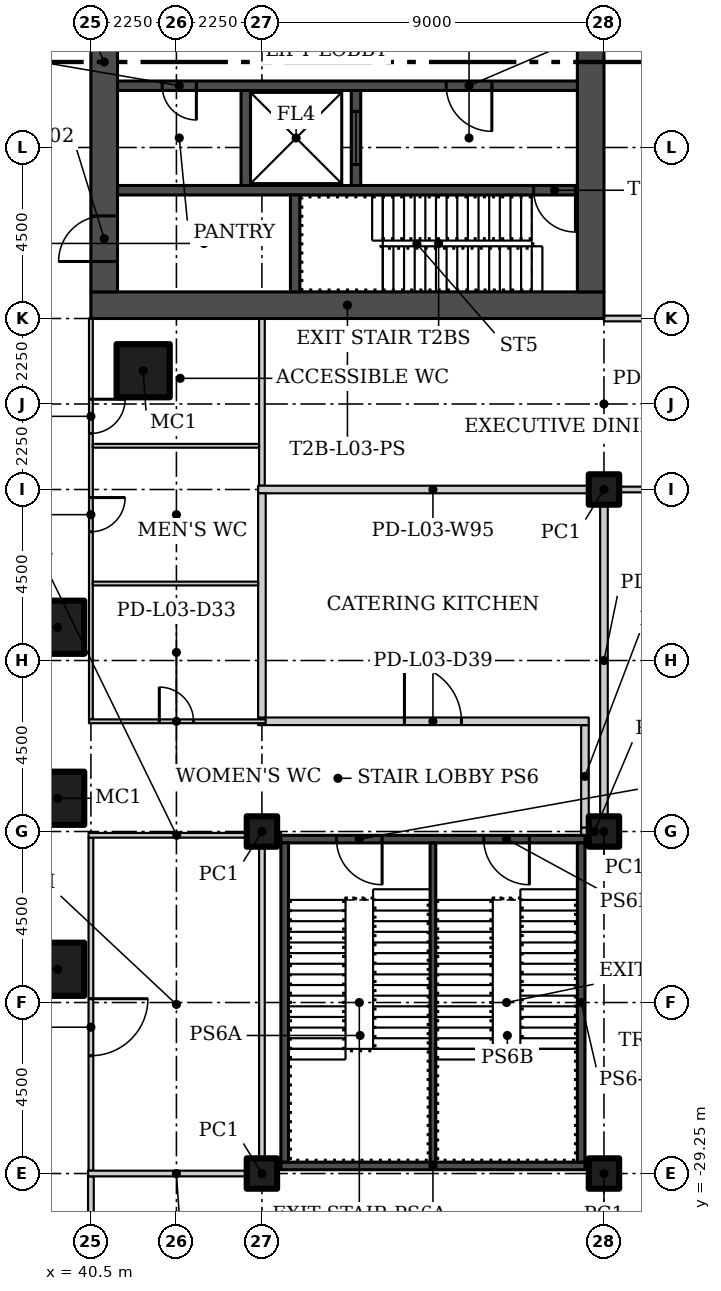
"""IFC4 building model, lengths in metres.
Left out: names, types, materials, properties, quantities, classifications, styles, units other than length and angle.
Written with IfcOpenShell. Run it as: python <this file> out.ifc"""

import sys

from ifc_helpers import new_model, si_unit, direction, frame, frame_2d, origin, origin_2d, place, context, subcontext, project, spatial, rectangle, hollow_rectangle, extrude, element, fill, save


model = new_model("IFC4")
c1 = context("Model", 3, precision=1e-05, world=origin(), true_north=direction((0.0, 1.0)))
c2 = subcontext(c1, "Body", "Model", "MODEL_VIEW")
j1 = project(units=[si_unit("LENGTHUNIT", "METRE"), si_unit("PLANEANGLEUNIT", "RADIAN")], contexts=[c1])
p1 = place(None, origin())
s1 = spatial("IfcSite", under=j1, at=p1, CompositionType="ELEMENT")
p2 = place(p1, origin())
s2 = spatial("IfcBuilding", under=s1, at=p2, CompositionType="ELEMENT")
p3 = place(p2, frame((0.0, 0.0, 18.5)))
s3 = spatial("IfcBuildingStorey", under=s2, at=p3, CompositionType="ELEMENT", Elevation=18.5)
for number, where in (
    (1, (41.875, -8.125, 0.0)),
    (2, (39.625, -14.875, 0.0)),
    (3, (39.625, -19.375, 0.0)),
    (4, (39.625, -23.875, 0.0)),
):
    element("IfcColumn", number, at=place(p3, frame(where)), inside=s3, PredefinedType="COLUMN", context=c2, shape_type="SweptSolid", body=[
        extrude(hollow_rectangle(XDim=1.4, YDim=1.4, WallThickness=0.06, at=origin_2d()), origin(), (0.0, 0.0, 1.0), 4.6),
    ])
for number, where in (
    (5, (45.0, -29.25, 0.0)),
    (6, (45.0, -20.25, 0.0)),
    (7, (54.0, -29.25, 0.0)),
    (8, (54.0, -20.25, 0.0)),
    (9, (54.0, -11.25, 0.0)),
):
    element("IfcColumn", number, at=place(p3, frame(where)), inside=s3, PredefinedType="COLUMN", context=c2, shape_type="SweptSolid", body=[
        extrude(hollow_rectangle(XDim=0.8, YDim=0.8, WallThickness=0.03, at=origin_2d()), origin(), (0.0, 0.0, 1.0), 4.6),
    ])
p4 = place(p3, frame((40.5, -29.325, 0.0), z_axis=(0.0, 0.0, 1.0), x_axis=(0.0, -1.0, 0.0)))
e10 = element("IfcWall", 10, at=p4, inside=s3, PredefinedType="PARTITIONING", context=c2, shape_type="SweptSolid", body=[
    extrude(rectangle(XDim=4.33, YDim=0.15, at=frame_2d((2.165, 0.0))), origin(), (0.0, 0.0, 1.0), 4.6),
])
p5 = place(p4, frame((1.425, 0.0, 0.0)))
e11 = element("IfcOpeningElement", 11, at=p5, cuts=e10, PredefinedType="OPENING", context=c2, shape_type="SweptSolid", body=[
    extrude(rectangle(XDim=1.5, YDim=2.1, at=frame_2d((0.75, 1.05))), frame((0.0, 0.085, 0.0), z_axis=(0.0, -1.0, 0.0), x_axis=(1.0, 0.0, 0.0)), (0.0, 0.0, 1.0), 0.17),
])
p6 = place(p3, frame((40.5, -6.75, 0.0), z_axis=(0.0, 0.0, 1.0), x_axis=(0.0, -1.0, 0.0)))
e12 = element("IfcWall", 12, at=p6, inside=s3, PredefinedType="PARTITIONING", context=c2, shape_type="SweptSolid", body=[
    extrude(rectangle(XDim=10.55, YDim=0.1, at=frame_2d((5.275, 0.0))), origin(), (0.0, 0.0, 1.0), 4.6),
])
p7 = place(p6, frame((2.125, 0.0, 0.0)))
e13 = element("IfcOpeningElement", 13, at=p7, cuts=e12, PredefinedType="OPENING", context=c2, shape_type="SweptSolid", body=[
    extrude(rectangle(XDim=0.9, YDim=2.1, at=frame_2d((0.45, 1.05))), frame((0.0, 0.06, 0.0), z_axis=(0.0, -1.0, 0.0), x_axis=(1.0, 0.0, 0.0)), (0.0, 0.0, 1.0), 0.12),
])
p8 = place(p6, frame((4.712, 0.0, 0.0)))
e14 = element("IfcOpeningElement", 14, at=p8, cuts=e12, PredefinedType="OPENING", context=c2, shape_type="SweptSolid", body=[
    extrude(rectangle(XDim=0.9, YDim=2.1, at=frame_2d((0.45, 1.05))), frame((0.0, 0.06, 0.0), z_axis=(0.0, -1.0, 0.0), x_axis=(1.0, 0.0, 0.0)), (0.0, 0.0, 1.0), 0.12),
])
p9 = place(p3, frame((40.5, -20.412, 0.0), z_axis=(0.0, 0.0, 1.0), x_axis=(0.0, -1.0, 0.0)))
e15 = element("IfcWall", 15, at=p9, inside=s3, PredefinedType="PARTITIONING", context=c2, shape_type="SweptSolid", body=[
    extrude(rectangle(XDim=8.763, YDim=0.125, at=frame_2d((4.381, 0.0))), origin(), (0.0, 0.0, 1.0), 4.6),
])
p10 = place(p9, frame((4.238, 0.0, 0.0)))
e16 = element("IfcOpeningElement", 16, at=p10, cuts=e15, PredefinedType="OPENING", context=c2, shape_type="SweptSolid", body=[
    extrude(rectangle(XDim=1.5, YDim=2.1, at=frame_2d((0.75, 1.05))), frame((0.0, 0.073, 0.0), z_axis=(0.0, -1.0, 0.0), x_axis=(1.0, 0.0, 0.0)), (0.0, 0.0, 1.0), 0.145),
])
p11 = place(p3, frame((45.075, -29.25, 0.0), z_axis=(0.0, 0.0, 1.0), x_axis=(-1.0, 0.0, 0.0)))
e17 = element("IfcWall", 17, at=p11, inside=s3, PredefinedType="PARTITIONING", context=c2, shape_type="SweptSolid", body=[
    extrude(rectangle(XDim=4.65, YDim=0.15, at=frame_2d((2.325, 0.0))), origin(), (0.0, 0.0, 1.0), 4.6),
])
p12 = place(p3, frame((54.0, -6.75, 0.0)))
e18 = element("IfcWall", 18, at=p12, inside=s3, PredefinedType="PARTITIONING", context=c2, shape_type="SweptSolid", body=[
    extrude(rectangle(XDim=8.905, YDim=0.15, at=frame_2d((4.453, 0.0))), origin(), (0.0, 0.0, 1.0), 4.6),
])
p13 = place(p12, frame((1.05, 0.0, 0.0)))
e19 = element("IfcOpeningElement", 19, at=p13, cuts=e18, PredefinedType="OPENING", context=c2, shape_type="SweptSolid", body=[
    extrude(rectangle(XDim=1.5, YDim=2.4, at=frame_2d((0.75, 1.2))), frame((0.0, 0.085, 0.0), z_axis=(0.0, -1.0, 0.0), x_axis=(1.0, 0.0, 0.0)), (0.0, 0.0, 1.0), 0.17),
])
p14 = place(p12, frame((5.85, 0.0, 0.0)))
e20 = element("IfcOpeningElement", 20, at=p14, cuts=e18, PredefinedType="OPENING", context=c2, shape_type="SweptSolid", body=[
    extrude(rectangle(XDim=1.5, YDim=2.4, at=frame_2d((0.75, 1.2))), frame((0.0, 0.085, 0.0), z_axis=(0.0, -1.0, 0.0), x_axis=(1.0, 0.0, 0.0)), (0.0, 0.0, 1.0), 0.17),
])
p15 = place(p3, frame((45.075, -20.35, 0.0), z_axis=(0.0, 0.0, 1.0), x_axis=(-1.0, 0.0, 0.0)))
e21 = element("IfcWall", 21, at=p15, inside=s3, PredefinedType="PARTITIONING", context=c2, shape_type="SweptSolid", body=[
    extrude(rectangle(XDim=4.637, YDim=0.125, at=frame_2d((2.319, 0.0))), origin(), (0.0, 0.0, 1.0), 4.6),
])
p16 = place(p3, frame((45.5, -20.35, 0.0), z_axis=(0.0, 0.0, 1.0), x_axis=(-1.0, 0.0, 0.0)))
e22 = element("IfcWall", 22, at=p16, inside=s3, PredefinedType="PARTITIONING", context=c2, shape_type="SweptSolid", body=[
    extrude(rectangle(XDim=0.575, YDim=0.15, at=frame_2d((0.288, 0.0))), origin(), (0.0, 0.0, 1.0), 4.6),
])
p17 = place(p3, frame((53.5, -17.45, 0.0), z_axis=(0.0, 0.0, 1.0), x_axis=(0.0, -1.0, 0.0)))
e23 = element("IfcWall", 23, at=p17, inside=s3, PredefinedType="PARTITIONING", context=c2, shape_type="SweptSolid", body=[
    extrude(rectangle(XDim=2.7, YDim=0.2, at=frame_2d((1.35, 0.0))), origin(), (0.0, 0.0, 1.0), 4.6),
])
p18 = place(p3, frame((44.9, -17.35, 0.0)))
e24 = element("IfcWall", 24, at=p18, inside=s3, PredefinedType="PARTITIONING", context=c2, shape_type="SweptSolid", body=[
    extrude(rectangle(XDim=8.7, YDim=0.2, at=frame_2d((4.35, 0.0))), origin(), (0.0, 0.0, 1.0), 4.6),
])
p19 = place(p18, frame((3.85, 0.0, 0.0)))
e25 = element("IfcOpeningElement", 25, at=p19, cuts=e24, PredefinedType="OPENING", context=c2, shape_type="SweptSolid", body=[
    extrude(rectangle(XDim=1.5, YDim=2.4, at=frame_2d((0.75, 1.2))), frame((0.0, 0.11, 0.0), z_axis=(0.0, -1.0, 0.0), x_axis=(1.0, 0.0, 0.0)), (0.0, 0.0, 1.0), 0.22),
])
p20 = place(p3, frame((40.45, -17.35, 0.0)))
e26 = element("IfcWall", 26, at=p20, inside=s3, PredefinedType="PARTITIONING", context=c2, shape_type="SweptSolid", body=[
    extrude(rectangle(XDim=4.65, YDim=0.1, at=frame_2d((2.325, 0.0))), origin(), (0.0, 0.0, 1.0), 4.6),
])
p21 = place(p20, frame((1.85, 0.0, 0.0)))
e27 = element("IfcOpeningElement", 27, at=p21, cuts=e26, PredefinedType="OPENING", context=c2, shape_type="SweptSolid", body=[
    extrude(rectangle(XDim=0.9, YDim=2.1, at=frame_2d((0.45, 1.05))), frame((0.0, 0.06, 0.0), z_axis=(0.0, -1.0, 0.0), x_axis=(1.0, 0.0, 0.0)), (0.0, 0.0, 1.0), 0.12),
])
p22 = place(p3, frame((54.1, -20.25, 0.0), z_axis=(0.0, 0.0, 1.0), x_axis=(-1.0, 0.0, 0.0)))
e28 = element("IfcWall", 28, at=p22, inside=s3, PredefinedType="PARTITIONING", context=c2, shape_type="SweptSolid", body=[
    extrude(rectangle(XDim=0.7, YDim=0.2, at=frame_2d((0.35, 0.0))), origin(), (0.0, 0.0, 1.0), 4.6),
])
p23 = place(p3, frame((62.905, -11.25, 0.0), z_axis=(0.0, 0.0, 1.0), x_axis=(-1.0, 0.0, 0.0)))
e29 = element("IfcWall", 29, at=p23, inside=s3, PredefinedType="PARTITIONING", context=c2, shape_type="SweptSolid", body=[
    extrude(rectangle(XDim=9.005, YDim=0.15, at=frame_2d((4.502, 0.0))), origin(), (0.0, 0.0, 1.0), 4.6),
])
p24 = place(p3, frame((54.0, -11.35, 0.0), z_axis=(0.0, 0.0, 1.0), x_axis=(0.0, -1.0, 0.0)))
e30 = element("IfcWall", 30, at=p24, inside=s3, PredefinedType="PARTITIONING", context=c2, shape_type="SweptSolid", body=[
    extrude(rectangle(XDim=8.8, YDim=0.2, at=frame_2d((4.4, 0.0))), origin(), (0.0, 0.0, 1.0), 4.6),
])
p25 = place(p3, frame((45.0, -6.75, 0.0), z_axis=(0.0, 0.0, 1.0), x_axis=(0.0, -1.0, 0.0)))
e31 = element("IfcWall", 31, at=p25, inside=s3, PredefinedType="PARTITIONING", context=c2, shape_type="SweptSolid", body=[
    extrude(rectangle(XDim=4.4, YDim=0.15, at=frame_2d((2.2, 0.0))), origin(), (0.0, 0.0, 1.0), 4.6),
])
p26 = place(p3, frame((45.0, -20.425, 0.0), z_axis=(0.0, 0.0, 1.0), x_axis=(0.0, -1.0, 0.0)))
e32 = element("IfcWall", 32, at=p26, inside=s3, PredefinedType="PARTITIONING", context=c2, shape_type="SweptSolid", body=[
    extrude(rectangle(XDim=8.75, YDim=0.15, at=frame_2d((4.375, 0.0))), origin(), (0.0, 0.0, 1.0), 4.6),
])
p27 = place(p3, frame((44.9, -11.25, 0.0)))
e33 = element("IfcWall", 33, at=p27, inside=s3, PredefinedType="PARTITIONING", context=c2, shape_type="SweptSolid", body=[
    extrude(rectangle(XDim=9.2, YDim=0.2, at=frame_2d((4.6, 0.0))), origin(), (0.0, 0.0, 1.0), 4.6),
])
p28 = place(p3, frame((45.0, -11.35, 0.0), z_axis=(0.0, 0.0, 1.0), x_axis=(0.0, -1.0, 0.0)))
e34 = element("IfcWall", 34, at=p28, inside=s3, PredefinedType="PARTITIONING", context=c2, shape_type="SweptSolid", body=[
    extrude(rectangle(XDim=5.899, YDim=0.2, at=frame_2d((2.95, 0.0))), origin(), (0.0, 0.0, 1.0), 4.6),
])
p29 = place(p3, frame((44.9, -13.725, 0.0), z_axis=(0.0, 0.0, 1.0), x_axis=(-1.0, 0.0, 0.0)))
e35 = element("IfcWall", 35, at=p29, inside=s3, PredefinedType="PARTITIONING", context=c2, shape_type="SweptSolid", body=[
    extrude(rectangle(XDim=4.35, YDim=0.1, at=frame_2d((2.175, 0.0))), origin(), (0.0, 0.0, 1.0), 4.6),
])
p30 = place(p3, frame((44.925, -10.1, 0.0), z_axis=(0.0, 0.0, 1.0), x_axis=(-1.0, 0.0, 0.0)))
e36 = element("IfcWall", 36, at=p30, inside=s3, PredefinedType="PARTITIONING", context=c2, shape_type="SweptSolid", body=[
    extrude(rectangle(XDim=4.375, YDim=0.1, at=frame_2d((2.188, 0.0))), origin(), (0.0, 0.0, 1.0), 4.6),
])
p31 = place(p3, frame((54.0, -6.4, 0.0), z_axis=(0.0, 0.0, 1.0), x_axis=(-1.0, 0.0, 0.0)))
e37 = element("IfcWall", 37, at=p31, inside=s3, PredefinedType="SHEAR", context=c2, shape_type="SweptSolid", body=[
    extrude(rectangle(XDim=13.5, YDim=0.7, at=frame_2d((6.75, 0.0))), origin(), (0.0, 0.0, 1.0), 4.6),
])
p32 = place(p3, frame((53.65, -6.05, 0.0), z_axis=(0.0, 0.0, 1.0), x_axis=(0.0, 1.0, 0.0)))
e38 = element("IfcWall", 38, at=p32, inside=s3, PredefinedType="SHEAR", context=c2, shape_type="SweptSolid", body=[
    extrude(rectangle(XDim=12.1, YDim=0.7, at=frame_2d((6.05, 0.0))), origin(), (0.0, 0.0, 1.0), 4.6),
])
p33 = place(p32, frame((6.4, 0.0, 0.0)))
e39 = element("IfcOpeningElement", 39, at=p33, cuts=e38, PredefinedType="OPENING", context=c2, shape_type="SweptSolid", body=[
    extrude(rectangle(XDim=1.8, YDim=2.4, at=frame_2d((0.9, 1.2))), frame((0.0, 0.36, 0.0), z_axis=(0.0, -1.0, 0.0), x_axis=(1.0, 0.0, 0.0)), (0.0, 0.0, 1.0), 0.72),
])
p34 = place(p3, frame((40.85, -6.05, 0.0), z_axis=(0.0, 0.0, 1.0), x_axis=(0.0, 1.0, 0.0)))
e40 = element("IfcWall", 40, at=p34, inside=s3, PredefinedType="SHEAR", context=c2, shape_type="SweptSolid", body=[
    extrude(rectangle(XDim=12.1, YDim=0.7, at=frame_2d((6.05, 0.0))), origin(), (0.0, 0.0, 1.0), 4.6),
])
p35 = place(p34, frame((0.8, 0.0, 0.0)))
e41 = element("IfcOpeningElement", 41, at=p35, cuts=e40, PredefinedType="OPENING", context=c2, shape_type="SweptSolid", body=[
    extrude(rectangle(XDim=1.2, YDim=2.1, at=frame_2d((0.6, 1.05))), frame((0.0, 0.36, 0.0), z_axis=(0.0, -1.0, 0.0), x_axis=(1.0, 0.0, 0.0)), (0.0, 0.0, 1.0), 0.72),
])
p36 = place(p34, frame((6.4, 0.0, 0.0)))
e42 = element("IfcOpeningElement", 42, at=p36, cuts=e40, PredefinedType="OPENING", context=c2, shape_type="SweptSolid", body=[
    extrude(rectangle(XDim=1.8, YDim=2.4, at=frame_2d((0.9, 1.2))), frame((0.0, 0.36, 0.0), z_axis=(0.0, -1.0, 0.0), x_axis=(1.0, 0.0, 0.0)), (0.0, 0.0, 1.0), 0.72),
])
p37 = place(p3, frame((53.3, -3.375, 0.0), z_axis=(0.0, 0.0, 1.0), x_axis=(-1.0, 0.0, 0.0)))
e43 = element("IfcWall", 43, at=p37, inside=s3, PredefinedType="SHEAR", context=c2, shape_type="SweptSolid", body=[
    extrude(rectangle(XDim=12.1, YDim=0.25, at=frame_2d((6.05, 0.0))), origin(), (0.0, 0.0, 1.0), 4.6),
])
p38 = place(p37, frame((0.05, 0.0, 0.0)))
e44 = element("IfcOpeningElement", 44, at=p38, cuts=e43, PredefinedType="OPENING", context=c2, shape_type="SweptSolid", body=[
    extrude(rectangle(XDim=1.1, YDim=2.1, at=frame_2d((0.55, 1.05))), frame((0.0, 0.135, 0.0), z_axis=(0.0, -1.0, 0.0), x_axis=(1.0, 0.0, 0.0)), (0.0, 0.0, 1.0), 0.27),
])
p39 = place(p3, frame((45.875, -6.05, 0.0), z_axis=(0.0, 0.0, 1.0), x_axis=(0.0, 1.0, 0.0)))
e45 = element("IfcWall", 45, at=p39, inside=s3, PredefinedType="SHEAR", context=c2, shape_type="SweptSolid", body=[
    extrude(rectangle(XDim=2.55, YDim=0.25, at=frame_2d((1.275, 0.0))), origin(), (0.0, 0.0, 1.0), 4.6),
])
p40 = place(p3, frame((53.3, -0.625, 0.0), z_axis=(0.0, 0.0, 1.0), x_axis=(-1.0, 0.0, 0.0)))
e46 = element("IfcWall", 46, at=p40, inside=s3, PredefinedType="SHEAR", context=c2, shape_type="SweptSolid", body=[
    extrude(rectangle(XDim=12.1, YDim=0.25, at=frame_2d((6.05, 0.0))), origin(), (0.0, 0.0, 1.0), 4.6),
])
p41 = place(p40, frame((2.25, 0.0, 0.0)))
e47 = element("IfcOpeningElement", 47, at=p41, cuts=e46, PredefinedType="OPENING", context=c2, shape_type="SweptSolid", body=[
    extrude(rectangle(XDim=1.2, YDim=2.1, at=frame_2d((0.6, 1.05))), frame((0.0, 0.135, 0.0), z_axis=(0.0, -1.0, 0.0), x_axis=(1.0, 0.0, 0.0)), (0.0, 0.0, 1.0), 0.27),
])
p42 = place(p40, frame((10.025, 0.0, 0.0)))
e48 = element("IfcOpeningElement", 48, at=p42, cuts=e46, PredefinedType="OPENING", context=c2, shape_type="SweptSolid", body=[
    extrude(rectangle(XDim=0.9, YDim=2.1, at=frame_2d((0.45, 1.05))), frame((0.0, 0.135, 0.0), z_axis=(0.0, -1.0, 0.0), x_axis=(1.0, 0.0, 0.0)), (0.0, 0.0, 1.0), 0.27),
])
p43 = place(p3, frame((47.475, -3.25, 0.0), z_axis=(0.0, 0.0, 1.0), x_axis=(0.0, 1.0, 0.0)))
e49 = element("IfcWall", 49, at=p43, inside=s3, PredefinedType="SHEAR", context=c2, shape_type="SweptSolid", body=[
    extrude(rectangle(XDim=2.5, YDim=0.25, at=frame_2d((1.25, 0.0))), origin(), (0.0, 0.0, 1.0), 4.6),
])
p44 = place(p43, frame((0.55, 0.0, 0.0)))
e50 = element("IfcOpeningElement", 50, at=p44, cuts=e49, PredefinedType="OPENING", context=c2, shape_type="SweptSolid", body=[
    extrude(rectangle(XDim=1.4, YDim=2.4, at=frame_2d((0.7, 1.2))), frame((0.0, 0.135, 0.0), z_axis=(0.0, -1.0, 0.0), x_axis=(1.0, 0.0, 0.0)), (0.0, 0.0, 1.0), 0.27),
])
p45 = place(p3, frame((44.575, -3.25, 0.0), z_axis=(0.0, 0.0, 1.0), x_axis=(0.0, 1.0, 0.0)))
e51 = element("IfcWall", 51, at=p45, inside=s3, PredefinedType="SHEAR", context=c2, shape_type="SweptSolid", body=[
    extrude(rectangle(XDim=2.5, YDim=0.25, at=frame_2d((1.25, 0.0))), origin(), (0.0, 0.0, 1.0), 4.6),
])
p46 = place(p3, frame((53.5, -20.45, 0.0), z_axis=(0.0, 0.0, 1.0), x_axis=(-1.0, 0.0, 0.0)))
e52 = element("IfcWall", 52, at=p46, inside=s3, PredefinedType="SHEAR", context=c2, shape_type="SweptSolid", body=[
    extrude(rectangle(XDim=8.0, YDim=0.2, at=frame_2d((4.0, 0.0))), origin(), (0.0, 0.0, 1.0), 4.6),
])
p47 = place(p46, frame((5.337, 0.0, 0.0)))
e53 = element("IfcOpeningElement", 53, at=p47, cuts=e52, PredefinedType="OPENING", context=c2, shape_type="SweptSolid", body=[
    extrude(rectangle(XDim=1.2, YDim=2.4, at=frame_2d((0.6, 1.2))), frame((0.0, 0.11, 0.0), z_axis=(0.0, -1.0, 0.0), x_axis=(1.0, 0.0, 0.0)), (0.0, 0.0, 1.0), 0.22),
])
p48 = place(p46, frame((1.462, 0.0, 0.0)))
e54 = element("IfcOpeningElement", 54, at=p48, cuts=e52, PredefinedType="OPENING", context=c2, shape_type="SweptSolid", body=[
    extrude(rectangle(XDim=1.2, YDim=2.4, at=frame_2d((0.6, 1.2))), frame((0.0, 0.11, 0.0), z_axis=(0.0, -1.0, 0.0), x_axis=(1.0, 0.0, 0.0)), (0.0, 0.0, 1.0), 0.22),
])
p49 = place(p3, frame((45.5, -29.05, 0.0)))
e55 = element("IfcWall", 55, at=p49, inside=s3, PredefinedType="SHEAR", context=c2, shape_type="SweptSolid", body=[
    extrude(rectangle(XDim=8.0, YDim=0.2, at=frame_2d((4.0, 0.0))), origin(), (0.0, 0.0, 1.0), 4.6),
])
for number, where, z_axis, x_axis in (
    (56, (45.6, -28.95, 0.0), (0.0, 0.0, 1.0), (0.0, 1.0, 0.0)),
    (57, (53.4, -28.95, 0.0), (0.0, 0.0, 1.0), (0.0, 1.0, 0.0)),
):
    element("IfcWall", number, at=place(p3, frame(where, z_axis=z_axis, x_axis=x_axis)), inside=s3, PredefinedType="SHEAR", context=c2, shape_type="SweptSolid", body=[
        extrude(rectangle(XDim=8.4, YDim=0.2, at=frame_2d((4.2, 0.0))), origin(), (0.0, 0.0, 1.0), 4.6),
    ])
p50 = place(p3, frame((49.5, -28.95, 0.0), z_axis=(0.0, 0.0, 1.0), x_axis=(0.0, 1.0, 0.0)))
e58 = element("IfcWall", 58, at=p50, inside=s3, PredefinedType="SHEAR", context=c2, shape_type="SweptSolid", body=[
    extrude(rectangle(XDim=8.4, YDim=0.15, at=frame_2d((4.2, 0.0))), origin(), (0.0, 0.0, 1.0), 4.6),
])
p51 = place(p10, origin())
e59 = element("IfcDoor", 59, at=p51, inside=s3, OperationType="DOUBLE_DOOR_SINGLE_SWING", PredefinedType="DOOR", context=c2, shape_type="SweptSolid", body=[
    extrude(rectangle(XDim=1.5, YDim=2.1, at=frame_2d((0.75, 1.05))), frame((0.0, 0.025, 0.0), z_axis=(0.0, -1.0, 0.0), x_axis=(1.0, 0.0, 0.0)), (0.0, 0.0, 1.0), 0.05),
])
fill(e16, e59)
p52 = place(p21, origin())
e60 = element("IfcDoor", 60, at=p52, inside=s3, OperationType="SINGLE_SWING_LEFT", PredefinedType="DOOR", context=c2, shape_type="SweptSolid", body=[
    extrude(rectangle(XDim=0.9, YDim=2.1, at=frame_2d((0.45, 1.05))), frame((0.0, 0.025, 0.0), z_axis=(0.0, -1.0, 0.0), x_axis=(1.0, 0.0, 0.0)), (0.0, 0.0, 1.0), 0.05),
])
fill(e27, e60)
p53 = place(p7, origin())
e61 = element("IfcDoor", 61, at=p53, inside=s3, OperationType="SINGLE_SWING_RIGHT", PredefinedType="DOOR", context=c2, shape_type="SweptSolid", body=[
    extrude(rectangle(XDim=0.9, YDim=2.1, at=frame_2d((0.45, 1.05))), frame((0.0, 0.025, 0.0), z_axis=(0.0, -1.0, 0.0), x_axis=(1.0, 0.0, 0.0)), (0.0, 0.0, 1.0), 0.05),
])
fill(e13, e61)
p54 = place(p8, origin())
e62 = element("IfcDoor", 62, at=p54, inside=s3, OperationType="SINGLE_SWING_RIGHT", PredefinedType="DOOR", context=c2, shape_type="SweptSolid", body=[
    extrude(rectangle(XDim=0.9, YDim=2.1, at=frame_2d((0.45, 1.05))), frame((0.0, 0.025, 0.0), z_axis=(0.0, -1.0, 0.0), x_axis=(1.0, 0.0, 0.0)), (0.0, 0.0, 1.0), 0.05),
])
fill(e14, e62)
p55 = place(p19, origin())
e63 = element("IfcDoor", 63, at=p55, inside=s3, OperationType="DOUBLE_DOOR_SINGLE_SWING", PredefinedType="DOOR", context=c2, shape_type="SweptSolid", body=[
    extrude(rectangle(XDim=1.5, YDim=2.4, at=frame_2d((0.75, 1.2))), frame((0.0, 0.025, 0.0), z_axis=(0.0, -1.0, 0.0), x_axis=(1.0, 0.0, 0.0)), (0.0, 0.0, 1.0), 0.05),
])
fill(e25, e63)
p56 = place(p35, origin())
e64 = element("IfcDoor", 64, at=p56, inside=s3, OperationType="SINGLE_SWING_LEFT", PredefinedType="DOOR", context=c2, shape_type="SweptSolid", body=[
    extrude(rectangle(XDim=1.2, YDim=2.1, at=frame_2d((0.6, 1.05))), frame((0.0, 0.025, 0.0), z_axis=(0.0, -1.0, 0.0), x_axis=(1.0, 0.0, 0.0)), (0.0, 0.0, 1.0), 0.05),
])
fill(e41, e64)
p57 = place(p38, origin())
e65 = element("IfcDoor", 65, at=p57, inside=s3, OperationType="SINGLE_SWING_LEFT", PredefinedType="DOOR", context=c2, shape_type="SweptSolid", body=[
    extrude(rectangle(XDim=1.1, YDim=2.1, at=frame_2d((0.55, 1.05))), frame((0.0, 0.025, 0.0), z_axis=(0.0, -1.0, 0.0), x_axis=(1.0, 0.0, 0.0)), (0.0, 0.0, 1.0), 0.05),
])
fill(e44, e65)
p58 = place(p41, origin())
e66 = element("IfcDoor", 66, at=p58, inside=s3, OperationType="SINGLE_SWING_LEFT", PredefinedType="DOOR", context=c2, shape_type="SweptSolid", body=[
    extrude(rectangle(XDim=1.2, YDim=2.1, at=frame_2d((0.6, 1.05))), frame((0.0, 0.025, 0.0), z_axis=(0.0, -1.0, 0.0), x_axis=(1.0, 0.0, 0.0)), (0.0, 0.0, 1.0), 0.05),
])
fill(e47, e66)
p59 = place(p42, origin())
e67 = element("IfcDoor", 67, at=p59, inside=s3, OperationType="SINGLE_SWING_RIGHT", PredefinedType="DOOR", context=c2, shape_type="SweptSolid", body=[
    extrude(rectangle(XDim=0.9, YDim=2.1, at=frame_2d((0.45, 1.05))), frame((0.0, 0.025, 0.0), z_axis=(0.0, -1.0, 0.0), x_axis=(1.0, 0.0, 0.0)), (0.0, 0.0, 1.0), 0.05),
])
fill(e48, e67)
p60 = place(p44, origin())
e68 = element("IfcDoor", 68, at=p60, inside=s3, OperationType="SLIDING_TO_LEFT", PredefinedType="DOOR", context=c2, shape_type="SweptSolid", body=[
    extrude(rectangle(XDim=1.4, YDim=2.4, at=frame_2d((0.7, 1.2))), frame((0.0, 0.025, 0.0), z_axis=(0.0, -1.0, 0.0), x_axis=(1.0, 0.0, 0.0)), (0.0, 0.0, 1.0), 0.05),
])
fill(e50, e68)
p61 = place(p47, origin())
e69 = element("IfcDoor", 69, at=p61, inside=s3, OperationType="SINGLE_SWING_LEFT", PredefinedType="DOOR", context=c2, shape_type="SweptSolid", body=[
    extrude(rectangle(XDim=1.2, YDim=2.4, at=frame_2d((0.6, 1.2))), frame((0.0, 0.025, 0.0), z_axis=(0.0, -1.0, 0.0), x_axis=(1.0, 0.0, 0.0)), (0.0, 0.0, 1.0), 0.05),
])
fill(e53, e69)
p62 = place(p48, origin())
e70 = element("IfcDoor", 70, at=p62, inside=s3, OperationType="SINGLE_SWING_RIGHT", PredefinedType="DOOR", context=c2, shape_type="SweptSolid", body=[
    extrude(rectangle(XDim=1.2, YDim=2.4, at=frame_2d((0.6, 1.2))), frame((0.0, 0.025, 0.0), z_axis=(0.0, -1.0, 0.0), x_axis=(1.0, 0.0, 0.0)), (0.0, 0.0, 1.0), 0.05),
])
fill(e54, e70)
save(model, sys.argv[1])
